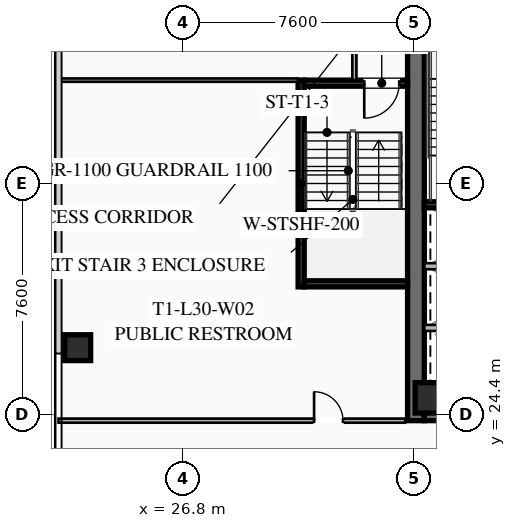
"""IFC4 building model, lengths in metres.
Left out: names, types, materials, properties, quantities, classifications, styles, units other than length and angle.
Written with IfcOpenShell. Run it as: python <this file> out.ifc"""

import sys

from ifc_helpers import new_model, si_unit, direction, frame, frame_2d, origin, origin_2d, place, context, subcontext, project, spatial, rectangle, hollow_rectangle, extrude, element, fill, save


model = new_model("IFC4")
c1 = context("Model", 3, precision=1e-05, world=origin(), true_north=direction((0.0, 1.0)))
c2 = subcontext(c1, "Body", "Model", "MODEL_VIEW")
j1 = project(units=[si_unit("LENGTHUNIT", "METRE"), si_unit("PLANEANGLEUNIT", "RADIAN")], contexts=[c1])
p1 = place(None, origin())
s1 = spatial("IfcSite", under=j1, at=p1, CompositionType="ELEMENT")
p2 = place(p1, origin())
s2 = spatial("IfcBuilding", under=s1, at=p2, CompositionType="ELEMENT")
p3 = place(p2, frame((0.0, 0.0, 114.4)))
s3 = spatial("IfcBuildingStorey", under=s2, at=p3, CompositionType="ELEMENT", Elevation=114.4)
p4 = place(p3, frame((34.475, 24.2, 0.0), z_axis=(0.0, 0.0, 1.0), x_axis=(0.0, 1.0, 0.0)))
e1 = element("IfcWall", 1, at=p4, inside=s3, PredefinedType="SHEAR", context=c2, shape_type="SweptSolid", body=[
    extrude(rectangle(XDim=15.6, YDim=0.55, at=frame_2d((7.8, 0.0))), origin(), (0.0, 0.0, 1.0), 3.55),
])
p5 = place(p3, frame((49.25, 24.475, 0.0), z_axis=(0.0, 0.0, 1.0), x_axis=(-1.0, 0.0, 0.0)))
e2 = element("IfcWall", 2, at=p5, inside=s3, PredefinedType="SHEAR", context=c2, shape_type="SweptSolid", body=[
    extrude(rectangle(XDim=14.5, YDim=0.55, at=frame_2d((7.25, 0.0))), origin(), (0.0, 0.0, 1.0), 3.55),
])
p6 = place(p5, frame((8.95, 0.0, 0.0)))
e3 = element("IfcOpeningElement", 3, at=p6, cuts=e2, PredefinedType="OPENING", context=c2, shape_type="SweptSolid", body=[
    extrude(rectangle(XDim=1.25, YDim=2.25, at=frame_2d((0.625, 1.125))), frame((0.0, 0.285, 0.0), z_axis=(0.0, -1.0, 0.0), x_axis=(1.0, 0.0, 0.0)), (0.0, 0.0, 1.0), 0.57),
])
p7 = place(p5, frame((3.9, 0.0, 0.0)))
e4 = element("IfcOpeningElement", 4, at=p7, cuts=e2, PredefinedType="OPENING", context=c2, shape_type="SweptSolid", body=[
    extrude(rectangle(XDim=1.25, YDim=2.25, at=frame_2d((0.625, 1.125))), frame((0.0, 0.285, 0.0), z_axis=(0.0, -1.0, 0.0), x_axis=(1.0, 0.0, 0.0)), (0.0, 0.0, 1.0), 0.57),
])
p8 = place(p3, frame((34.95, 24.95, 0.0), z_axis=(0.0, 0.0, 1.0), x_axis=(1.0, 0.0, 0.0)))
e5 = element("IfcColumn", 5, at=p8, inside=s3, PredefinedType="COLUMN", context=c2, shape_type="SweptSolid", body=[
    extrude(hollow_rectangle(XDim=1.0, YDim=1.0, WallThickness=0.04, at=origin_2d()), origin(), (0.0, 0.0, 1.0), 3.37),
])
p9 = place(p3, frame((23.35, 26.6, 0.0), z_axis=(0.0, 0.0, 1.0), x_axis=(1.0, 0.0, 0.0)))
e6 = element("IfcColumn", 6, at=p9, inside=s3, PredefinedType="COLUMN", context=c2, shape_type="SweptSolid", body=[
    extrude(hollow_rectangle(XDim=0.85, YDim=0.85, WallThickness=0.035, at=origin_2d()), origin(), (0.0, 0.0, 1.0), 3.37),
])
p10 = place(p3, frame((34.75, 31.3, 0.0), z_axis=(0.0, 0.0, 1.0), x_axis=(1.0, 0.0, 0.0)))
e7 = element("IfcWall", 7, at=p10, inside=s3, PredefinedType="SHEAR", context=c2, shape_type="SweptSolid", body=[
    extrude(rectangle(XDim=3.55, YDim=0.2, at=frame_2d((1.775, 0.0))), origin(), (0.0, 0.0, 1.0), 3.37),
])
for number, where, z_axis, x_axis in (
    (8, (34.75, 27.25, 0.0), (0.0, 0.0, 1.0), (1.0, 0.0, 0.0)),
    (9, (34.75, 29.28, 0.0), (0.0, 0.0, 1.0), (1.0, 0.0, 0.0)),
):
    element("IfcWall", number, at=place(p3, frame(where, z_axis=z_axis, x_axis=x_axis)), inside=s3, PredefinedType="SOLIDWALL", context=c2, shape_type="SweptSolid", body=[
        extrude(rectangle(XDim=3.2, YDim=0.2, at=frame_2d((1.6, 0.0))), origin(), (0.0, 0.0, 1.0), 3.37),
    ])
p11 = place(p3, frame((30.7, 28.6, 0.0), z_axis=(0.0, 0.0, 1.0), x_axis=(0.0, 1.0, 0.0)))
e10 = element("IfcWall", 10, at=p11, inside=s3, PredefinedType="SHEAR", context=c2, shape_type="SweptSolid", body=[
    extrude(rectangle(XDim=6.8, YDim=0.2, at=frame_2d((3.4, 0.0))), origin(), (0.0, 0.0, 1.0), 3.37),
])
p12 = place(p3, frame((34.2, 35.3, 0.0), z_axis=(0.0, 0.0, 1.0), x_axis=(-1.0, 0.0, 0.0)))
e11 = element("IfcWall", 11, at=p12, inside=s3, PredefinedType="SHEAR", context=c2, shape_type="SweptSolid", body=[
    extrude(rectangle(XDim=3.4, YDim=0.2, at=frame_2d((1.7, 0.0))), origin(), (0.0, 0.0, 1.0), 3.37),
])
p13 = place(p12, frame((0.275, 0.0, 0.0)))
e12 = element("IfcOpeningElement", 12, at=p13, cuts=e11, PredefinedType="OPENING", context=c2, shape_type="SweptSolid", body=[
    extrude(rectangle(XDim=1.15, YDim=2.2, at=frame_2d((0.575, 1.1))), frame((0.0, 0.11, 0.0), z_axis=(0.0, -1.0, 0.0), x_axis=(1.0, 0.0, 0.0)), (0.0, 0.0, 1.0), 0.22),
])
p14 = place(p3, frame((30.8, 28.7, 0.0), z_axis=(0.0, 0.0, 1.0), x_axis=(1.0, 0.0, 0.0)))
e13 = element("IfcWall", 13, at=p14, inside=s3, PredefinedType="SHEAR", context=c2, shape_type="SweptSolid", body=[
    extrude(rectangle(XDim=3.4, YDim=0.2, at=frame_2d((1.7, 0.0))), origin(), (0.0, 0.0, 1.0), 3.37),
])
p15 = place(p3, frame((32.45, 35.4, 0.0), z_axis=(0.0, 0.0, 1.0), x_axis=(0.0, 1.0, 0.0)))
e14 = element("IfcWall", 14, at=p15, inside=s3, PredefinedType="PARTITIONING", context=c2, shape_type="SweptSolid", body=[
    extrude(rectangle(XDim=4.4, YDim=0.135, at=frame_2d((2.2, 0.0))), origin(), (0.0, 0.0, 1.0), 2.723),
])
p16 = place(p3, frame((22.72, 24.2, 0.0), z_axis=(0.0, 0.0, 1.0), x_axis=(1.0, 0.0, 0.0)))
e15 = element("IfcWall", 15, at=p16, inside=s3, PredefinedType="PARTITIONING", context=c2, shape_type="SweptSolid", body=[
    extrude(rectangle(XDim=11.4, YDim=0.135, at=frame_2d((5.7, 0.0))), origin(), (0.0, 0.0, 1.0), 2.723),
])
p17 = place(p16, frame((8.405, 0.0, 0.0)))
e16 = element("IfcOpeningElement", 16, at=p17, cuts=e15, PredefinedType="OPENING", context=c2, shape_type="SweptSolid", body=[
    extrude(rectangle(XDim=0.95, YDim=2.05, at=frame_2d((0.475, 1.025))), frame((0.0, 0.077, 0.0), z_axis=(0.0, -1.0, 0.0), x_axis=(1.0, 0.0, 0.0)), (0.0, 0.0, 1.0), 0.155),
])
p18 = place(p3, frame((30.6, 35.4, 0.0), z_axis=(0.0, 0.0, 1.0), x_axis=(-1.0, 0.0, 0.0)))
e17 = element("IfcWall", 17, at=p18, inside=s3, PredefinedType="PARTITIONING", context=c2, shape_type="SweptSolid", body=[
    extrude(rectangle(XDim=7.88, YDim=0.11, at=frame_2d((3.94, 0.0))), origin(), (0.0, 0.0, 1.0), 2.723),
])
p19 = place(p13, origin())
e18 = element("IfcDoor", 18, at=p19, inside=s3, OperationType="SINGLE_SWING_RIGHT", PredefinedType="DOOR", context=c2, shape_type="SweptSolid", body=[
    extrude(rectangle(XDim=1.15, YDim=2.2, at=frame_2d((0.575, 1.1))), frame((0.0, 0.025, 0.0), z_axis=(0.0, -1.0, 0.0), x_axis=(1.0, 0.0, 0.0)), (0.0, 0.0, 1.0), 0.05),
])
fill(e12, e18)
p20 = place(p17, origin())
e19 = element("IfcDoor", 19, at=p20, inside=s3, OperationType="SINGLE_SWING_LEFT", PredefinedType="DOOR", context=c2, shape_type="SweptSolid", body=[
    extrude(rectangle(XDim=0.95, YDim=2.05, at=frame_2d((0.475, 1.025))), frame((0.0, 0.025, 0.0), z_axis=(0.0, -1.0, 0.0), x_axis=(1.0, 0.0, 0.0)), (0.0, 0.0, 1.0), 0.05),
])
fill(e16, e19)
save(model, sys.argv[1])
